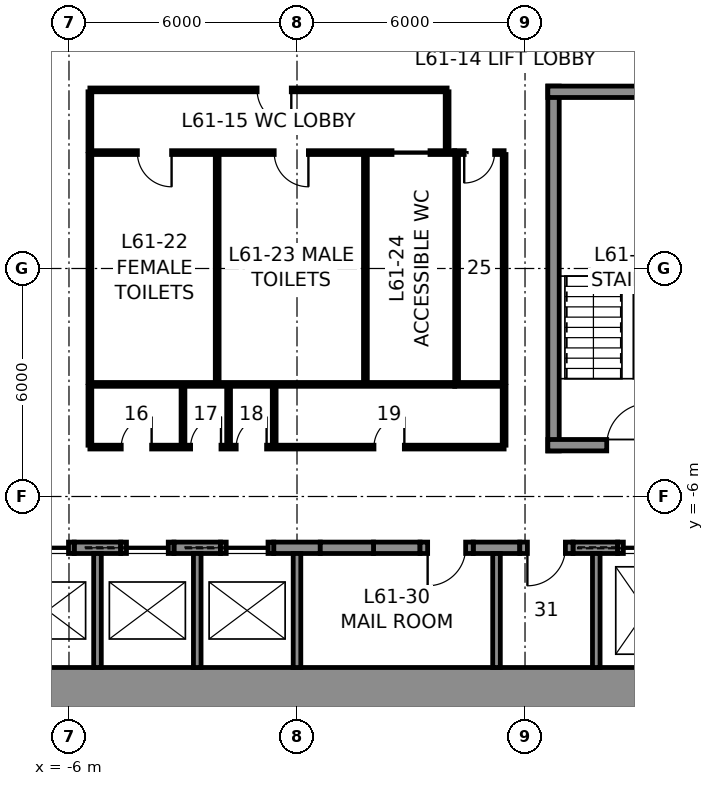
"""IFC4 building model, lengths in metres.
Left out: names, types, materials, properties, quantities, classifications, styles, units other than length and angle.
Written with IfcOpenShell. Run it as: python <this file> out.ifc"""

import sys

from ifc_helpers import new_model, si_unit, direction, frame, frame_2d, origin, place, context, subcontext, project, spatial, rectangle, extrude, element, fill, save


model = new_model("IFC4")
c1 = context("Model", 3, precision=1e-05, world=origin(), true_north=direction((0.0, 1.0)))
c2 = subcontext(c1, "Body", "Model", "MODEL_VIEW")
j1 = project(units=[si_unit("LENGTHUNIT", "METRE"), si_unit("PLANEANGLEUNIT", "RADIAN")], contexts=[c1])
p1 = place(None, origin())
s1 = spatial("IfcSite", under=j1, at=p1, CompositionType="ELEMENT")
p2 = place(p1, origin())
s2 = spatial("IfcBuilding", under=s1, at=p2, CompositionType="ELEMENT")
p3 = place(p2, frame((0.0, 0.0, 273.8)))
s3 = spatial("IfcBuildingStorey", under=s2, at=p3, CompositionType="ELEMENT", Elevation=273.8)
p4 = place(p3, frame((12.0, -11.25, 0.0), z_axis=(0.0, 0.0, 1.0), x_axis=(-1.0, 0.0, 0.0)))
e1 = element("IfcWall", 1, at=p4, inside=s3, PredefinedType="SHEAR", context=c2, shape_type="SweptSolid", body=[
    extrude(rectangle(XDim=24.0, YDim=1.5, at=frame_2d((12.0, 0.0))), origin(), (0.0, 0.0, 1.0), 4.0),
])
for number, where, z_axis, x_axis in (
    (2, (-5.863, -7.35, 0.0), (0.0, 0.0, 1.0), (1.0, 0.0, 0.0)),
    (3, (-3.238, -7.35, 0.0), (0.0, 0.0, 1.0), (1.0, 0.0, 0.0)),
    (4, (-0.613, -7.35, 0.0), (0.0, 0.0, 1.0), (1.0, 0.0, 0.0)),
    (5, (2.012, -7.35, 0.0), (0.0, 0.0, 1.0), (1.0, 0.0, 0.0)),
    (6, (4.637, -7.35, 0.0), (0.0, 0.0, 1.0), (1.0, 0.0, 0.0)),
):
    element("IfcWall", number, at=place(p3, frame(where, z_axis=z_axis, x_axis=x_axis)), inside=s3, PredefinedType="SHEAR", context=c2, shape_type="SweptSolid", body=[
        extrude(rectangle(XDim=1.225, YDim=0.3, at=frame_2d((0.613, 0.0))), origin(), (0.0, 0.0, 1.0), 4.0),
    ])
p5 = place(p3, frame((7.262, -7.35, 0.0), z_axis=(0.0, 0.0, 1.0), x_axis=(1.0, 0.0, 0.0)))
e7 = element("IfcWall", 7, at=p5, inside=s3, PredefinedType="SHEAR", context=c2, shape_type="SweptSolid", body=[
    extrude(rectangle(XDim=1.175, YDim=0.3, at=frame_2d((0.587, 0.0))), origin(), (0.0, 0.0, 1.0), 4.0),
])
p6 = place(p3, frame((-7.262, -7.35, 0.0), z_axis=(0.0, 0.0, 1.0), x_axis=(1.0, 0.0, 0.0)))
e8 = element("IfcWall", 8, at=p6, inside=s3, PredefinedType="PARTITIONING", context=c2, shape_type="SweptSolid", body=[
    extrude(rectangle(XDim=1.4, YDim=0.3, at=frame_2d((0.7, 0.0))), origin(), (0.0, 0.0, 1.0), 4.0),
])
p7 = place(p6, frame((0.15, 0.0, 0.0)))
e9 = element("IfcOpeningElement", 9, at=p7, cuts=e8, PredefinedType="OPENING", context=c2, shape_type="SweptSolid", body=[
    extrude(rectangle(XDim=1.1, YDim=2.3, at=frame_2d((0.55, 1.15))), frame((0.0, 0.16, 0.0), z_axis=(0.0, -1.0, 0.0), x_axis=(1.0, 0.0, 0.0)), (0.0, 0.0, 1.0), 0.32),
])
p8 = place(p3, frame((-4.637, -7.35, 0.0), z_axis=(0.0, 0.0, 1.0), x_axis=(1.0, 0.0, 0.0)))
e10 = element("IfcWall", 10, at=p8, inside=s3, PredefinedType="PARTITIONING", context=c2, shape_type="SweptSolid", body=[
    extrude(rectangle(XDim=1.4, YDim=0.3, at=frame_2d((0.7, 0.0))), origin(), (0.0, 0.0, 1.0), 4.0),
])
p9 = place(p8, frame((0.15, 0.0, 0.0)))
e11 = element("IfcOpeningElement", 11, at=p9, cuts=e10, PredefinedType="OPENING", context=c2, shape_type="SweptSolid", body=[
    extrude(rectangle(XDim=1.1, YDim=2.3, at=frame_2d((0.55, 1.15))), frame((0.0, 0.16, 0.0), z_axis=(0.0, -1.0, 0.0), x_axis=(1.0, 0.0, 0.0)), (0.0, 0.0, 1.0), 0.32),
])
p10 = place(p3, frame((-2.012, -7.35, 0.0), z_axis=(0.0, 0.0, 1.0), x_axis=(1.0, 0.0, 0.0)))
e12 = element("IfcWall", 12, at=p10, inside=s3, PredefinedType="PARTITIONING", context=c2, shape_type="SweptSolid", body=[
    extrude(rectangle(XDim=1.4, YDim=0.3, at=frame_2d((0.7, 0.0))), origin(), (0.0, 0.0, 1.0), 4.0),
])
p11 = place(p10, frame((0.15, 0.0, 0.0)))
e13 = element("IfcOpeningElement", 13, at=p11, cuts=e12, PredefinedType="OPENING", context=c2, shape_type="SweptSolid", body=[
    extrude(rectangle(XDim=1.1, YDim=2.3, at=frame_2d((0.55, 1.15))), frame((0.0, 0.16, 0.0), z_axis=(0.0, -1.0, 0.0), x_axis=(1.0, 0.0, 0.0)), (0.0, 0.0, 1.0), 0.32),
])
p12 = place(p3, frame((0.613, -7.35, 0.0), z_axis=(0.0, 0.0, 1.0), x_axis=(1.0, 0.0, 0.0)))
e14 = element("IfcWall", 14, at=p12, inside=s3, PredefinedType="PARTITIONING", context=c2, shape_type="SweptSolid", body=[
    extrude(rectangle(XDim=1.4, YDim=0.3, at=frame_2d((0.7, 0.0))), origin(), (0.0, 0.0, 1.0), 4.0),
])
p13 = place(p3, frame((3.238, -7.35, 0.0), z_axis=(0.0, 0.0, 1.0), x_axis=(1.0, 0.0, 0.0)))
e15 = element("IfcWall", 15, at=p13, inside=s3, PredefinedType="PARTITIONING", context=c2, shape_type="SweptSolid", body=[
    extrude(rectangle(XDim=1.4, YDim=0.3, at=frame_2d((0.7, 0.0))), origin(), (0.0, 0.0, 1.0), 4.0),
])
p14 = place(p13, frame((0.2, 0.0, 0.0)))
e16 = element("IfcOpeningElement", 16, at=p14, cuts=e15, PredefinedType="OPENING", context=c2, shape_type="SweptSolid", body=[
    extrude(rectangle(XDim=1.0, YDim=2.3, at=frame_2d((0.5, 1.15))), frame((0.0, 0.16, 0.0), z_axis=(0.0, -1.0, 0.0), x_axis=(1.0, 0.0, 0.0)), (0.0, 0.0, 1.0), 0.32),
])
p15 = place(p3, frame((5.863, -7.35, 0.0), z_axis=(0.0, 0.0, 1.0), x_axis=(1.0, 0.0, 0.0)))
e17 = element("IfcWall", 17, at=p15, inside=s3, PredefinedType="PARTITIONING", context=c2, shape_type="SweptSolid", body=[
    extrude(rectangle(XDim=1.4, YDim=0.3, at=frame_2d((0.7, 0.0))), origin(), (0.0, 0.0, 1.0), 4.0),
])
p16 = place(p15, frame((0.2, 0.0, 0.0)))
e18 = element("IfcOpeningElement", 18, at=p16, cuts=e17, PredefinedType="OPENING", context=c2, shape_type="SweptSolid", body=[
    extrude(rectangle(XDim=1.0, YDim=2.3, at=frame_2d((0.5, 1.15))), frame((0.0, 0.16, 0.0), z_axis=(0.0, -1.0, 0.0), x_axis=(1.0, 0.0, 0.0)), (0.0, 0.0, 1.0), 0.32),
])
p17 = place(p3, frame((8.438, -7.35, 0.0), z_axis=(0.0, 0.0, 1.0), x_axis=(1.0, 0.0, 0.0)))
e19 = element("IfcWall", 19, at=p17, inside=s3, PredefinedType="PARTITIONING", context=c2, shape_type="SweptSolid", body=[
    extrude(rectangle(XDim=1.5, YDim=0.3, at=frame_2d((0.75, 0.0))), origin(), (0.0, 0.0, 1.0), 4.0),
])
p18 = place(p17, frame((0.15, 0.0, 0.0)))
e20 = element("IfcOpeningElement", 20, at=p18, cuts=e19, PredefinedType="OPENING", context=c2, shape_type="SweptSolid", body=[
    extrude(rectangle(XDim=1.2, YDim=2.3, at=frame_2d((0.6, 1.15))), frame((0.0, 0.16, 0.0), z_axis=(0.0, -1.0, 0.0), x_axis=(1.0, 0.0, 0.0)), (0.0, 0.0, 1.0), 0.32),
])
for number, where, z_axis, x_axis in (
    (21, (-5.25, -10.5, 0.0), (0.0, 0.0, 1.0), (0.0, 1.0, 0.0)),
    (22, (-2.625, -10.5, 0.0), (0.0, 0.0, 1.0), (0.0, 1.0, 0.0)),
    (23, (0.0, -10.5, 0.0), (0.0, 0.0, 1.0), (0.0, 1.0, 0.0)),
    (24, (5.25, -10.5, 0.0), (0.0, 0.0, 1.0), (0.0, 1.0, 0.0)),
    (25, (7.875, -10.5, 0.0), (0.0, 0.0, 1.0), (0.0, 1.0, 0.0)),
):
    element("IfcWall", number, at=place(p3, frame(where, z_axis=z_axis, x_axis=x_axis)), inside=s3, PredefinedType="PARTITIONING", context=c2, shape_type="SweptSolid", body=[
        extrude(rectangle(XDim=3.0, YDim=0.2, at=frame_2d((1.5, 0.0))), origin(), (0.0, 0.0, 1.0), 4.0),
    ])
p19 = place(p3, frame((6.75, -4.8, 0.0), z_axis=(0.0, 0.0, 1.0), x_axis=(0.0, 1.0, 0.0)))
e26 = element("IfcWall", 26, at=p19, inside=s3, PredefinedType="SOLIDWALL", context=c2, shape_type="SweptSolid", body=[
    extrude(rectangle(XDim=9.6, YDim=0.3, at=frame_2d((4.8, 0.0))), origin(), (0.0, 0.0, 1.0), 3.75),
])
p20 = place(p3, frame((6.6, 4.65, 0.0), z_axis=(0.0, 0.0, 1.0), x_axis=(1.0, 0.0, 0.0)))
e27 = element("IfcWall", 27, at=p20, inside=s3, PredefinedType="SOLIDWALL", context=c2, shape_type="SweptSolid", body=[
    extrude(rectangle(XDim=3.9, YDim=0.3, at=frame_2d((1.95, 0.0))), origin(), (0.0, 0.0, 1.0), 3.75),
])
p21 = place(p3, frame((10.5, -4.65, 0.0), z_axis=(0.0, 0.0, 1.0), x_axis=(-1.0, 0.0, 0.0)))
e28 = element("IfcWall", 28, at=p21, inside=s3, PredefinedType="SOLIDWALL", context=c2, shape_type="SweptSolid", body=[
    extrude(rectangle(XDim=3.9, YDim=0.3, at=frame_2d((1.95, 0.0))), origin(), (0.0, 0.0, 1.0), 3.75),
])
p22 = place(p21, frame((1.25, 0.0, 0.0)))
e29 = element("IfcOpeningElement", 29, at=p22, cuts=e28, PredefinedType="OPENING", context=c2, shape_type="SweptSolid", body=[
    extrude(rectangle(XDim=1.1, YDim=2.3, at=frame_2d((0.55, 1.15))), frame((0.0, 0.16, 0.0), z_axis=(0.0, -1.0, 0.0), x_axis=(1.0, 0.0, 0.0)), (0.0, 0.0, 1.0), 0.32),
])
p23 = place(p3, frame((-5.45, 3.05, 0.0), z_axis=(0.0, 0.0, 1.0), x_axis=(1.0, 0.0, 0.0)))
e30 = element("IfcWall", 30, at=p23, inside=s3, PredefinedType="PARTITIONING", context=c2, shape_type="SweptSolid", body=[
    extrude(rectangle(XDim=9.6, YDim=0.1, at=frame_2d((4.8, 0.0))), origin(), (0.0, 0.0, 1.0), 3.75),
])
p24 = place(p23, frame((1.25, 0.0, 0.0)))
e31 = element("IfcOpeningElement", 31, at=p24, cuts=e30, PredefinedType="OPENING", context=c2, shape_type="SweptSolid", body=[
    extrude(rectangle(XDim=0.9, YDim=2.3, at=frame_2d((0.45, 1.15))), frame((0.0, 0.06, 0.0), z_axis=(0.0, -1.0, 0.0), x_axis=(1.0, 0.0, 0.0)), (0.0, 0.0, 1.0), 0.12),
])
p25 = place(p23, frame((4.85, 0.0, 0.0)))
e32 = element("IfcOpeningElement", 32, at=p25, cuts=e30, PredefinedType="OPENING", context=c2, shape_type="SweptSolid", body=[
    extrude(rectangle(XDim=0.9, YDim=2.3, at=frame_2d((0.45, 1.15))), frame((0.0, 0.06, 0.0), z_axis=(0.0, -1.0, 0.0), x_axis=(1.0, 0.0, 0.0)), (0.0, 0.0, 1.0), 0.12),
])
p26 = place(p23, frame((7.95, 0.0, 0.0)))
e33 = element("IfcOpeningElement", 33, at=p26, cuts=e30, PredefinedType="OPENING", context=c2, shape_type="SweptSolid", body=[
    extrude(rectangle(XDim=1.0, YDim=2.3, at=frame_2d((0.5, 1.15))), frame((0.0, 0.06, 0.0), z_axis=(0.0, -1.0, 0.0), x_axis=(1.0, 0.0, 0.0)), (0.0, 0.0, 1.0), 0.12),
])
p27 = place(p3, frame((4.15, 3.05, 0.0), z_axis=(0.0, 0.0, 1.0), x_axis=(1.0, 0.0, 0.0)))
e34 = element("IfcWall", 34, at=p27, inside=s3, PredefinedType="PARTITIONING", context=c2, shape_type="SweptSolid", body=[
    extrude(rectangle(XDim=1.3, YDim=0.1, at=frame_2d((0.65, 0.0))), origin(), (0.0, 0.0, 1.0), 3.75),
])
p28 = place(p27, frame((0.25, 0.0, 0.0)))
e35 = element("IfcOpeningElement", 35, at=p28, cuts=e34, PredefinedType="OPENING", context=c2, shape_type="SweptSolid", body=[
    extrude(rectangle(XDim=0.8, YDim=2.3, at=frame_2d((0.4, 1.15))), frame((0.0, 0.06, 0.0), z_axis=(0.0, -1.0, 0.0), x_axis=(1.0, 0.0, 0.0)), (0.0, 0.0, 1.0), 0.12),
])
p29 = place(p3, frame((4.15, -3.05, 0.0), z_axis=(0.0, 0.0, 1.0), x_axis=(-1.0, 0.0, 0.0)))
e36 = element("IfcWall", 36, at=p29, inside=s3, PredefinedType="PARTITIONING", context=c2, shape_type="SweptSolid", body=[
    extrude(rectangle(XDim=9.6, YDim=0.1, at=frame_2d((4.8, 0.0))), origin(), (0.0, 0.0, 1.0), 3.75),
])
p30 = place(p3, frame((5.45, -3.05, 0.0), z_axis=(0.0, 0.0, 1.0), x_axis=(-1.0, 0.0, 0.0)))
e37 = element("IfcWall", 37, at=p30, inside=s3, PredefinedType="PARTITIONING", context=c2, shape_type="SweptSolid", body=[
    extrude(rectangle(XDim=1.3, YDim=0.1, at=frame_2d((0.65, 0.0))), origin(), (0.0, 0.0, 1.0), 3.75),
])
for number, where, z_axis, x_axis in (
    (38, (5.45, 3.0, 0.0), (0.0, 0.0, 1.0), (0.0, -1.0, 0.0)),
    (39, (-5.45, -3.0, 0.0), (0.0, 0.0, 1.0), (0.0, 1.0, 0.0)),
    (40, (-2.1, -3.0, 0.0), (0.0, 0.0, 1.0), (0.0, 1.0, 0.0)),
    (41, (1.8, -3.0, 0.0), (0.0, 0.0, 1.0), (0.0, 1.0, 0.0)),
    (42, (4.2, -3.0, 0.0), (0.0, 0.0, 1.0), (0.0, 1.0, 0.0)),
):
    element("IfcWall", number, at=place(p3, frame(where, z_axis=z_axis, x_axis=x_axis)), inside=s3, PredefinedType="PARTITIONING", context=c2, shape_type="SweptSolid", body=[
        extrude(rectangle(XDim=6.0, YDim=0.1, at=frame_2d((3.0, 0.0))), origin(), (0.0, 0.0, 1.0), 3.75),
    ])
p31 = place(p3, frame((-5.45, 4.7, 0.0), z_axis=(0.0, 0.0, 1.0), x_axis=(1.0, 0.0, 0.0)))
e43 = element("IfcWall", 43, at=p31, inside=s3, PredefinedType="PARTITIONING", context=c2, shape_type="SweptSolid", body=[
    extrude(rectangle(XDim=9.4, YDim=0.1, at=frame_2d((4.7, 0.0))), origin(), (0.0, 0.0, 1.0), 3.75),
])
p32 = place(p31, frame((4.4, 0.0, 0.0)))
e44 = element("IfcOpeningElement", 44, at=p32, cuts=e43, PredefinedType="OPENING", context=c2, shape_type="SweptSolid", body=[
    extrude(rectangle(XDim=0.9, YDim=2.3, at=frame_2d((0.45, 1.15))), frame((0.0, 0.06, 0.0), z_axis=(0.0, -1.0, 0.0), x_axis=(1.0, 0.0, 0.0)), (0.0, 0.0, 1.0), 0.12),
])
for number, where, z_axis, x_axis in (
    (45, (-5.45, 3.1, 0.0), (0.0, 0.0, 1.0), (0.0, 1.0, 0.0)),
    (46, (3.95, 3.1, 0.0), (0.0, 0.0, 1.0), (0.0, 1.0, 0.0)),
):
    element("IfcWall", number, at=place(p3, frame(where, z_axis=z_axis, x_axis=x_axis)), inside=s3, PredefinedType="PARTITIONING", context=c2, shape_type="SweptSolid", body=[
        extrude(rectangle(XDim=1.55, YDim=0.1, at=frame_2d((0.775, 0.0))), origin(), (0.0, 0.0, 1.0), 3.75),
    ])
p33 = place(p3, frame((5.45, -4.7, 0.0), z_axis=(0.0, 0.0, 1.0), x_axis=(-1.0, 0.0, 0.0)))
e47 = element("IfcWall", 47, at=p33, inside=s3, PredefinedType="PARTITIONING", context=c2, shape_type="SweptSolid", body=[
    extrude(rectangle(XDim=10.9, YDim=0.1, at=frame_2d((5.45, 0.0))), origin(), (0.0, 0.0, 1.0), 3.75),
])
p34 = place(p33, frame((9.275, 0.0, 0.0)))
e48 = element("IfcOpeningElement", 48, at=p34, cuts=e47, PredefinedType="OPENING", context=c2, shape_type="SweptSolid", body=[
    extrude(rectangle(XDim=0.8, YDim=2.3, at=frame_2d((0.4, 1.15))), frame((0.0, 0.06, 0.0), z_axis=(0.0, -1.0, 0.0), x_axis=(1.0, 0.0, 0.0)), (0.0, 0.0, 1.0), 0.12),
])
p35 = place(p33, frame((7.45, 0.0, 0.0)))
e49 = element("IfcOpeningElement", 49, at=p35, cuts=e47, PredefinedType="OPENING", context=c2, shape_type="SweptSolid", body=[
    extrude(rectangle(XDim=0.8, YDim=2.3, at=frame_2d((0.4, 1.15))), frame((0.0, 0.06, 0.0), z_axis=(0.0, -1.0, 0.0), x_axis=(1.0, 0.0, 0.0)), (0.0, 0.0, 1.0), 0.12),
])
p36 = place(p33, frame((6.25, 0.0, 0.0)))
e50 = element("IfcOpeningElement", 50, at=p36, cuts=e47, PredefinedType="OPENING", context=c2, shape_type="SweptSolid", body=[
    extrude(rectangle(XDim=0.8, YDim=2.3, at=frame_2d((0.4, 1.15))), frame((0.0, 0.06, 0.0), z_axis=(0.0, -1.0, 0.0), x_axis=(1.0, 0.0, 0.0)), (0.0, 0.0, 1.0), 0.12),
])
p37 = place(p33, frame((2.625, 0.0, 0.0)))
e51 = element("IfcOpeningElement", 51, at=p37, cuts=e47, PredefinedType="OPENING", context=c2, shape_type="SweptSolid", body=[
    extrude(rectangle(XDim=0.8, YDim=2.3, at=frame_2d((0.4, 1.15))), frame((0.0, 0.06, 0.0), z_axis=(0.0, -1.0, 0.0), x_axis=(1.0, 0.0, 0.0)), (0.0, 0.0, 1.0), 0.12),
])
for number, where, z_axis, x_axis in (
    (52, (-5.45, -3.1, 0.0), (0.0, 0.0, 1.0), (0.0, -1.0, 0.0)),
    (53, (5.45, -3.1, 0.0), (0.0, 0.0, 1.0), (0.0, -1.0, 0.0)),
    (54, (-3.0, -3.1, 0.0), (0.0, 0.0, 1.0), (0.0, -1.0, 0.0)),
    (55, (-1.8, -3.1, 0.0), (0.0, 0.0, 1.0), (0.0, -1.0, 0.0)),
    (56, (-0.6, -3.1, 0.0), (0.0, 0.0, 1.0), (0.0, -1.0, 0.0)),
):
    element("IfcWall", number, at=place(p3, frame(where, z_axis=z_axis, x_axis=x_axis)), inside=s3, PredefinedType="PARTITIONING", context=c2, shape_type="SweptSolid", body=[
        extrude(rectangle(XDim=1.55, YDim=0.1, at=frame_2d((0.775, 0.0))), origin(), (0.0, 0.0, 1.0), 3.75),
    ])
p38 = place(p22, frame((1.1, 0.0, 0.0), z_axis=(0.0, 0.0, 1.0), x_axis=(-1.0, 0.0, 0.0)))
e57 = element("IfcDoor", 57, at=p38, inside=s3, OperationType="SINGLE_SWING_RIGHT", PredefinedType="DOOR", context=c2, shape_type="SweptSolid", body=[
    extrude(rectangle(XDim=1.1, YDim=2.3, at=frame_2d((0.55, 1.15))), frame((0.0, 0.025, 0.0), z_axis=(0.0, -1.0, 0.0), x_axis=(1.0, 0.0, 0.0)), (0.0, 0.0, 1.0), 0.05),
])
fill(e29, e57)
p39 = place(p24, frame((0.9, 0.0, 0.0), z_axis=(0.0, 0.0, 1.0), x_axis=(-1.0, 0.0, 0.0)))
e58 = element("IfcDoor", 58, at=p39, inside=s3, OperationType="SINGLE_SWING_LEFT", PredefinedType="DOOR", context=c2, shape_type="SweptSolid", body=[
    extrude(rectangle(XDim=0.9, YDim=2.3, at=frame_2d((0.45, 1.15))), frame((0.0, 0.025, 0.0), z_axis=(0.0, -1.0, 0.0), x_axis=(1.0, 0.0, 0.0)), (0.0, 0.0, 1.0), 0.05),
])
fill(e31, e58)
p40 = place(p25, frame((0.9, 0.0, 0.0), z_axis=(0.0, 0.0, 1.0), x_axis=(-1.0, 0.0, 0.0)))
e59 = element("IfcDoor", 59, at=p40, inside=s3, OperationType="SINGLE_SWING_LEFT", PredefinedType="DOOR", context=c2, shape_type="SweptSolid", body=[
    extrude(rectangle(XDim=0.9, YDim=2.3, at=frame_2d((0.45, 1.15))), frame((0.0, 0.025, 0.0), z_axis=(0.0, -1.0, 0.0), x_axis=(1.0, 0.0, 0.0)), (0.0, 0.0, 1.0), 0.05),
])
fill(e32, e59)
p41 = place(p26, frame((1.0, 0.0, 0.0), z_axis=(0.0, 0.0, 1.0), x_axis=(-1.0, 0.0, 0.0)))
e60 = element("IfcDoor", 60, at=p41, inside=s3, OperationType="SLIDING_TO_LEFT", PredefinedType="DOOR", context=c2, shape_type="SweptSolid", body=[
    extrude(rectangle(XDim=1.0, YDim=2.3, at=frame_2d((0.5, 1.15))), frame((0.0, 0.025, 0.0), z_axis=(0.0, -1.0, 0.0), x_axis=(1.0, 0.0, 0.0)), (0.0, 0.0, 1.0), 0.05),
])
fill(e33, e60)
p42 = place(p28, frame((0.8, 0.0, 0.0), z_axis=(0.0, 0.0, 1.0), x_axis=(-1.0, 0.0, 0.0)))
e61 = element("IfcDoor", 61, at=p42, inside=s3, OperationType="SINGLE_SWING_RIGHT", PredefinedType="DOOR", context=c2, shape_type="SweptSolid", body=[
    extrude(rectangle(XDim=0.8, YDim=2.3, at=frame_2d((0.4, 1.15))), frame((0.0, 0.025, 0.0), z_axis=(0.0, -1.0, 0.0), x_axis=(1.0, 0.0, 0.0)), (0.0, 0.0, 1.0), 0.05),
])
fill(e35, e61)
p43 = place(p32, frame((0.9, 0.0, 0.0), z_axis=(0.0, 0.0, 1.0), x_axis=(-1.0, 0.0, 0.0)))
e62 = element("IfcDoor", 62, at=p43, inside=s3, OperationType="SINGLE_SWING_LEFT", PredefinedType="DOOR", context=c2, shape_type="SweptSolid", body=[
    extrude(rectangle(XDim=0.9, YDim=2.3, at=frame_2d((0.45, 1.15))), frame((0.0, 0.025, 0.0), z_axis=(0.0, -1.0, 0.0), x_axis=(1.0, 0.0, 0.0)), (0.0, 0.0, 1.0), 0.05),
])
fill(e44, e62)
p44 = place(p34, frame((0.8, 0.0, 0.0), z_axis=(0.0, 0.0, 1.0), x_axis=(-1.0, 0.0, 0.0)))
e63 = element("IfcDoor", 63, at=p44, inside=s3, OperationType="SINGLE_SWING_RIGHT", PredefinedType="DOOR", context=c2, shape_type="SweptSolid", body=[
    extrude(rectangle(XDim=0.8, YDim=2.3, at=frame_2d((0.4, 1.15))), frame((0.0, 0.025, 0.0), z_axis=(0.0, -1.0, 0.0), x_axis=(1.0, 0.0, 0.0)), (0.0, 0.0, 1.0), 0.05),
])
fill(e48, e63)
p45 = place(p35, frame((0.8, 0.0, 0.0), z_axis=(0.0, 0.0, 1.0), x_axis=(-1.0, 0.0, 0.0)))
e64 = element("IfcDoor", 64, at=p45, inside=s3, OperationType="SINGLE_SWING_RIGHT", PredefinedType="DOOR", context=c2, shape_type="SweptSolid", body=[
    extrude(rectangle(XDim=0.8, YDim=2.3, at=frame_2d((0.4, 1.15))), frame((0.0, 0.025, 0.0), z_axis=(0.0, -1.0, 0.0), x_axis=(1.0, 0.0, 0.0)), (0.0, 0.0, 1.0), 0.05),
])
fill(e49, e64)
p46 = place(p36, frame((0.8, 0.0, 0.0), z_axis=(0.0, 0.0, 1.0), x_axis=(-1.0, 0.0, 0.0)))
e65 = element("IfcDoor", 65, at=p46, inside=s3, OperationType="SINGLE_SWING_RIGHT", PredefinedType="DOOR", context=c2, shape_type="SweptSolid", body=[
    extrude(rectangle(XDim=0.8, YDim=2.3, at=frame_2d((0.4, 1.15))), frame((0.0, 0.025, 0.0), z_axis=(0.0, -1.0, 0.0), x_axis=(1.0, 0.0, 0.0)), (0.0, 0.0, 1.0), 0.05),
])
fill(e50, e65)
p47 = place(p37, frame((0.8, 0.0, 0.0), z_axis=(0.0, 0.0, 1.0), x_axis=(-1.0, 0.0, 0.0)))
e66 = element("IfcDoor", 66, at=p47, inside=s3, OperationType="SINGLE_SWING_RIGHT", PredefinedType="DOOR", context=c2, shape_type="SweptSolid", body=[
    extrude(rectangle(XDim=0.8, YDim=2.3, at=frame_2d((0.4, 1.15))), frame((0.0, 0.025, 0.0), z_axis=(0.0, -1.0, 0.0), x_axis=(1.0, 0.0, 0.0)), (0.0, 0.0, 1.0), 0.05),
])
fill(e51, e66)
p48 = place(p14, frame((1.0, 0.0, 0.0), z_axis=(0.0, 0.0, 1.0), x_axis=(-1.0, 0.0, 0.0)))
e67 = element("IfcDoor", 67, at=p48, inside=s3, OperationType="SINGLE_SWING_RIGHT", PredefinedType="DOOR", context=c2, shape_type="SweptSolid", body=[
    extrude(rectangle(XDim=1.0, YDim=2.3, at=frame_2d((0.5, 1.15))), frame((0.0, 0.025, 0.0), z_axis=(0.0, -1.0, 0.0), x_axis=(1.0, 0.0, 0.0)), (0.0, 0.0, 1.0), 0.05),
])
fill(e16, e67)
p49 = place(p16, frame((1.0, 0.0, 0.0), z_axis=(0.0, 0.0, 1.0), x_axis=(-1.0, 0.0, 0.0)))
e68 = element("IfcDoor", 68, at=p49, inside=s3, OperationType="SINGLE_SWING_RIGHT", PredefinedType="DOOR", context=c2, shape_type="SweptSolid", body=[
    extrude(rectangle(XDim=1.0, YDim=2.3, at=frame_2d((0.5, 1.15))), frame((0.0, 0.025, 0.0), z_axis=(0.0, -1.0, 0.0), x_axis=(1.0, 0.0, 0.0)), (0.0, 0.0, 1.0), 0.05),
])
fill(e18, e68)
p50 = place(p18, origin())
e69 = element("IfcDoor", 69, at=p50, inside=s3, OperationType="SLIDING_TO_LEFT", PredefinedType="DOOR", context=c2, shape_type="SweptSolid", body=[
    extrude(rectangle(XDim=1.2, YDim=2.3, at=frame_2d((0.6, 1.15))), frame((0.0, 0.025, 0.0), z_axis=(0.0, -1.0, 0.0), x_axis=(1.0, 0.0, 0.0)), (0.0, 0.0, 1.0), 0.05),
])
fill(e20, e69)
p51 = place(p11, origin())
e70 = element("IfcDoor", 70, at=p51, inside=s3, OperationType="SLIDING_TO_LEFT", PredefinedType="DOOR", context=c2, shape_type="SweptSolid", body=[
    extrude(rectangle(XDim=1.1, YDim=2.3, at=frame_2d((0.55, 1.15))), frame((0.0, 0.025, 0.0), z_axis=(0.0, -1.0, 0.0), x_axis=(1.0, 0.0, 0.0)), (0.0, 0.0, 1.0), 0.05),
])
fill(e13, e70)
p52 = place(p9, origin())
e71 = element("IfcDoor", 71, at=p52, inside=s3, OperationType="SLIDING_TO_LEFT", PredefinedType="DOOR", context=c2, shape_type="SweptSolid", body=[
    extrude(rectangle(XDim=1.1, YDim=2.3, at=frame_2d((0.55, 1.15))), frame((0.0, 0.025, 0.0), z_axis=(0.0, -1.0, 0.0), x_axis=(1.0, 0.0, 0.0)), (0.0, 0.0, 1.0), 0.05),
])
fill(e11, e71)
p53 = place(p7, origin())
e72 = element("IfcDoor", 72, at=p53, inside=s3, OperationType="SLIDING_TO_LEFT", PredefinedType="DOOR", context=c2, shape_type="SweptSolid", body=[
    extrude(rectangle(XDim=1.1, YDim=2.3, at=frame_2d((0.55, 1.15))), frame((0.0, 0.025, 0.0), z_axis=(0.0, -1.0, 0.0), x_axis=(1.0, 0.0, 0.0)), (0.0, 0.0, 1.0), 0.05),
])
fill(e9, e72)
save(model, sys.argv[1])
